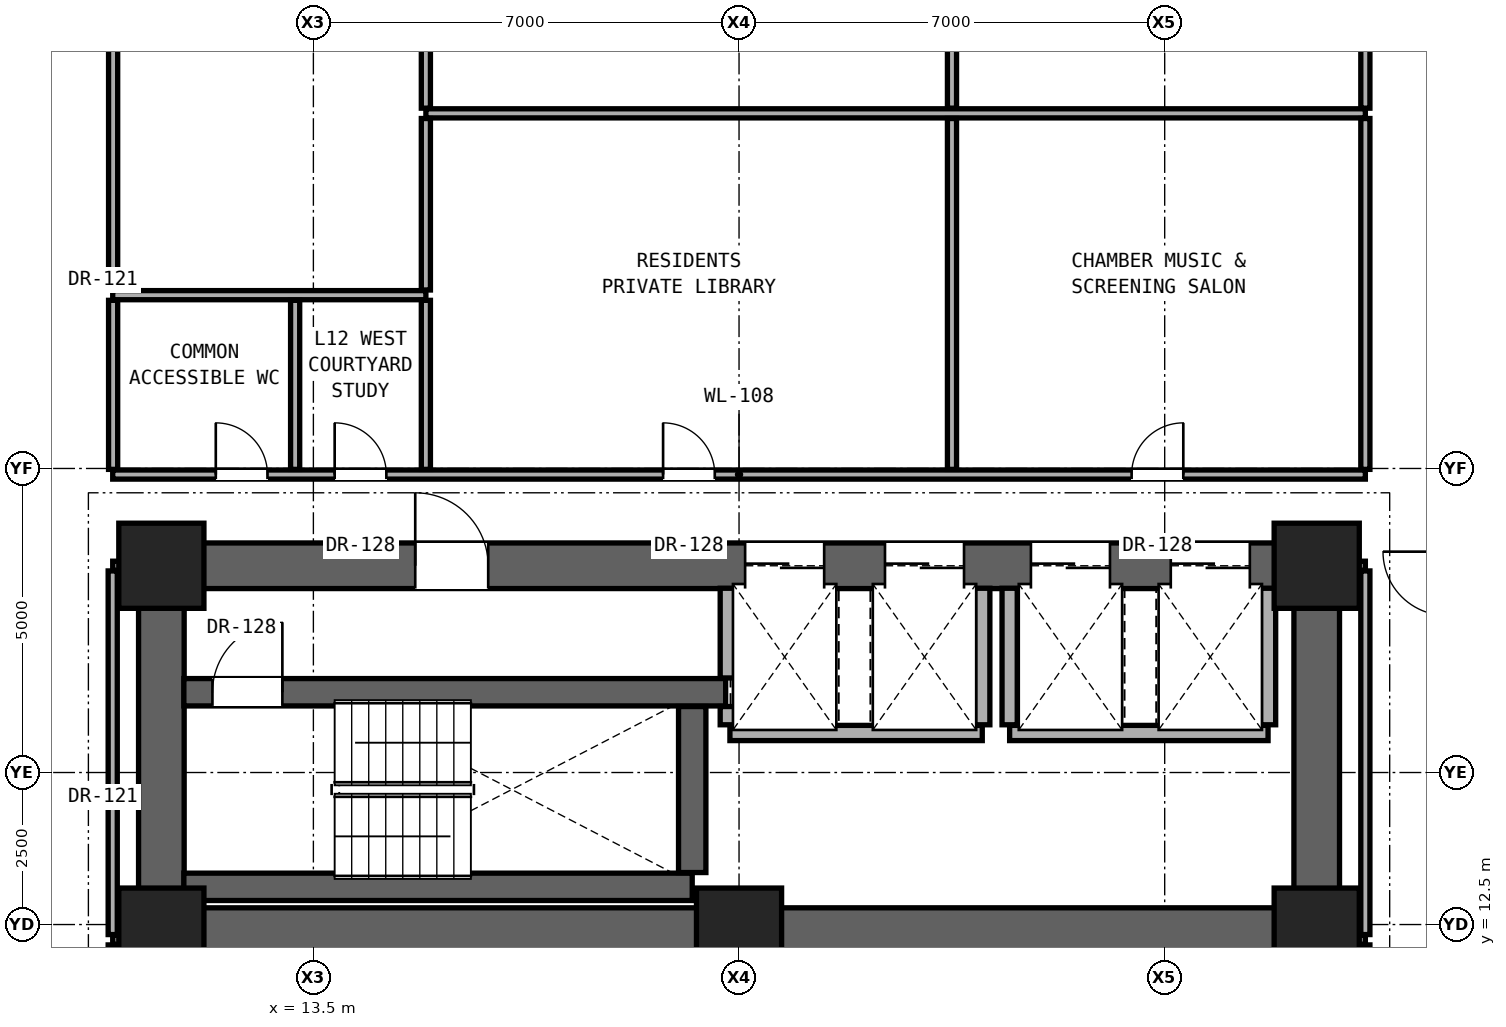
"""IFC4 building model, lengths in metres.
Left out: names, types, materials, properties, quantities, classifications, styles, units other than length and angle.
Written with IfcOpenShell. Run it as: python <this file> out.ifc"""

import sys

from ifc_helpers import new_model, si_unit, direction, frame, frame_2d, origin, origin_2d, place, context, subcontext, project, spatial, rectangle, extrude, element, fill, save


model = new_model("IFC4")
c1 = context("Model", 3, precision=1e-05, world=origin(), true_north=direction((0.0, 1.0)))
c2 = subcontext(c1, "Body", "Model", "MODEL_VIEW")
j1 = project(units=[si_unit("LENGTHUNIT", "METRE"), si_unit("PLANEANGLEUNIT", "RADIAN")], contexts=[c1])
p1 = place(None, origin())
s1 = spatial("IfcSite", under=j1, at=p1, CompositionType="ELEMENT")
p2 = place(p1, origin())
s2 = spatial("IfcBuilding", under=s1, at=p2, CompositionType="ELEMENT")
p3 = place(p2, frame((0.0, 0.0, 45.5)))
s3 = spatial("IfcBuildingStorey", under=s2, at=p3, CompositionType="ELEMENT", Elevation=45.5)
for number, where, z_axis, x_axis in (
    (1, (11.0, 12.4, 0.0), (0.0, 0.0, 1.0), (1.0, 0.0, 0.0)),
    (2, (20.5, 12.4, 0.0), (0.0, 0.0, 1.0), (1.0, 0.0, 0.0)),
    (3, (30.0, 12.4, 0.0), (0.0, 0.0, 1.0), (1.0, 0.0, 0.0)),
    (4, (11.0, 18.4, 0.0), (0.0, 0.0, 1.0), (1.0, 0.0, 0.0)),
    (5, (30.0, 18.4, 0.0), (0.0, 0.0, 1.0), (1.0, 0.0, 0.0)),
):
    element("IfcColumn", number, at=place(p3, frame(where, z_axis=z_axis, x_axis=x_axis)), inside=s3, PredefinedType="COLUMN", context=c2, shape_type="SweptSolid", body=[
        extrude(rectangle(XDim=1.4, YDim=1.4, at=origin_2d()), origin(), (0.0, 0.0, 1.0), 3.3),
    ])
p4 = place(p3, frame((11.0, 12.4, 0.0), z_axis=(0.0, 0.0, 1.0), x_axis=(1.0, 0.0, 0.0)))
e6 = element("IfcWall", 6, at=p4, inside=s3, PredefinedType="SHEAR", context=c2, shape_type="SweptSolid", body=[
    extrude(rectangle(XDim=19.0, YDim=0.75, at=frame_2d((9.5, 0.0))), origin(), (0.0, 0.0, 1.0), 3.06),
])
for number, where, z_axis, x_axis in (
    (7, (11.0, 12.4, 0.0), (0.0, 0.0, 1.0), (0.0, 1.0, 0.0)),
    (8, (30.0, 12.4, 0.0), (0.0, 0.0, 1.0), (0.0, 1.0, 0.0)),
):
    element("IfcWall", number, at=place(p3, frame(where, z_axis=z_axis, x_axis=x_axis)), inside=s3, PredefinedType="SHEAR", context=c2, shape_type="SweptSolid", body=[
        extrude(rectangle(XDim=6.0, YDim=0.75, at=frame_2d((3.0, 0.0))), origin(), (0.0, 0.0, 1.0), 3.06),
    ])
p5 = place(p3, frame((11.0, 18.4, 0.0), z_axis=(0.0, 0.0, 1.0), x_axis=(1.0, 0.0, 0.0)))
e9 = element("IfcWall", 9, at=p5, inside=s3, PredefinedType="SHEAR", context=c2, shape_type="SweptSolid", body=[
    extrude(rectangle(XDim=19.0, YDim=0.75, at=frame_2d((9.5, 0.0))), origin(), (0.0, 0.0, 1.0), 3.06),
])
p6 = place(p5, frame((4.175, 0.0, 0.0)))
e10 = element("IfcOpeningElement", 10, at=p6, cuts=e9, PredefinedType="OPENING", context=c2, shape_type="SweptSolid", body=[
    extrude(rectangle(XDim=1.2, YDim=2.25, at=frame_2d((0.6, 1.125))), frame((0.0, 0.385, 0.0), z_axis=(0.0, -1.0, 0.0), x_axis=(1.0, 0.0, 0.0)), (0.0, 0.0, 1.0), 0.77),
])
p7 = place(p5, frame((9.6, 0.0, 0.0)))
e11 = element("IfcOpeningElement", 11, at=p7, cuts=e9, PredefinedType="OPENING", context=c2, shape_type="SweptSolid", body=[
    extrude(rectangle(XDim=1.3, YDim=2.3, at=frame_2d((0.65, 1.15))), frame((0.0, 0.385, 0.0), z_axis=(0.0, -1.0, 0.0), x_axis=(1.0, 0.0, 0.0)), (0.0, 0.0, 1.0), 0.77),
])
p8 = place(p5, frame((11.9, 0.0, 0.0)))
e12 = element("IfcOpeningElement", 12, at=p8, cuts=e9, PredefinedType="OPENING", context=c2, shape_type="SweptSolid", body=[
    extrude(rectangle(XDim=1.3, YDim=2.3, at=frame_2d((0.65, 1.15))), frame((0.0, 0.385, 0.0), z_axis=(0.0, -1.0, 0.0), x_axis=(1.0, 0.0, 0.0)), (0.0, 0.0, 1.0), 0.77),
])
p9 = place(p5, frame((14.3, 0.0, 0.0)))
e13 = element("IfcOpeningElement", 13, at=p9, cuts=e9, PredefinedType="OPENING", context=c2, shape_type="SweptSolid", body=[
    extrude(rectangle(XDim=1.3, YDim=2.3, at=frame_2d((0.65, 1.15))), frame((0.0, 0.385, 0.0), z_axis=(0.0, -1.0, 0.0), x_axis=(1.0, 0.0, 0.0)), (0.0, 0.0, 1.0), 0.77),
])
p10 = place(p5, frame((16.6, 0.0, 0.0)))
e14 = element("IfcOpeningElement", 14, at=p10, cuts=e9, PredefinedType="OPENING", context=c2, shape_type="SweptSolid", body=[
    extrude(rectangle(XDim=1.3, YDim=2.3, at=frame_2d((0.65, 1.15))), frame((0.0, 0.385, 0.0), z_axis=(0.0, -1.0, 0.0), x_axis=(1.0, 0.0, 0.0)), (0.0, 0.0, 1.0), 0.77),
])
for number, where, z_axis, x_axis in (
    (15, (10.2, 12.25, 0.0), (0.0, 0.0, 1.0), (1.0, 0.0, 0.0)),
    (16, (30.37, 12.25, 0.0), (0.0, 0.0, 1.0), (1.0, 0.0, 0.0)),
):
    element("IfcWall", number, at=place(p3, frame(where, z_axis=z_axis, x_axis=x_axis)), inside=s3, PredefinedType="PARTITIONING", context=c2, shape_type="SweptSolid", body=[
        extrude(rectangle(XDim=0.43, YDim=0.15, at=frame_2d((0.215, 0.0))), origin(), (0.0, 0.0, 1.0), 3.06),
    ])
p11 = place(p3, frame((11.37, 13.12, 0.0), z_axis=(0.0, 0.0, 1.0), x_axis=(1.0, 0.0, 0.0)))
e17 = element("IfcWall", 17, at=p11, inside=s3, PredefinedType="SHEAR", context=c2, shape_type="SweptSolid", body=[
    extrude(rectangle(XDim=8.36, YDim=0.45, at=frame_2d((4.18, 0.0))), origin(), (0.0, 0.0, 1.0), 3.06),
])
p12 = place(p3, frame((20.35, 15.65, 0.0), z_axis=(0.0, 0.0, 1.0), x_axis=(1.0, 0.0, 0.0)))
e18 = element("IfcWall", 18, at=p12, inside=s3, PredefinedType="SOLIDWALL", context=c2, shape_type="SweptSolid", body=[
    extrude(rectangle(XDim=4.15, YDim=0.25, at=frame_2d((2.075, 0.0))), origin(), (0.0, 0.0, 1.0), 3.06),
])
p13 = place(p3, frame((24.95, 15.65, 0.0), z_axis=(0.0, 0.0, 1.0), x_axis=(1.0, 0.0, 0.0)))
e19 = element("IfcWall", 19, at=p13, inside=s3, PredefinedType="SOLIDWALL", context=c2, shape_type="SweptSolid", body=[
    extrude(rectangle(XDim=4.25, YDim=0.25, at=frame_2d((2.125, 0.0))), origin(), (0.0, 0.0, 1.0), 3.06),
])
p14 = place(p3, frame((11.37, 16.32, 0.0), z_axis=(0.0, 0.0, 1.0), x_axis=(1.0, 0.0, 0.0)))
e20 = element("IfcWall", 20, at=p14, inside=s3, PredefinedType="SHEAR", context=c2, shape_type="SweptSolid", body=[
    extrude(rectangle(XDim=8.91, YDim=0.45, at=frame_2d((4.455, 0.0))), origin(), (0.0, 0.0, 1.0), 3.06),
])
p15 = place(p14, frame((0.47, 0.0, 0.0)))
e21 = element("IfcOpeningElement", 21, at=p15, cuts=e20, PredefinedType="OPENING", context=c2, shape_type="SweptSolid", body=[
    extrude(rectangle(XDim=1.15, YDim=2.2, at=frame_2d((0.575, 1.1))), frame((0.0, 0.235, 0.0), z_axis=(0.0, -1.0, 0.0), x_axis=(1.0, 0.0, 0.0)), (0.0, 0.0, 1.0), 0.47),
])
for number, where, z_axis, x_axis in (
    (22, (10.2, 18.4, 0.0), (0.0, 0.0, 1.0), (1.0, 0.0, 0.0)),
    (23, (30.37, 18.4, 0.0), (0.0, 0.0, 1.0), (1.0, 0.0, 0.0)),
):
    element("IfcWall", number, at=place(p3, frame(where, z_axis=z_axis, x_axis=x_axis)), inside=s3, PredefinedType="PARTITIONING", context=c2, shape_type="SweptSolid", body=[
        extrude(rectangle(XDim=0.43, YDim=0.15, at=frame_2d((0.215, 0.0))), origin(), (0.0, 0.0, 1.0), 2.436),
    ])
p16 = place(p3, frame((10.2, 19.9, 0.0), z_axis=(0.0, 0.0, 1.0), x_axis=(1.0, 0.0, 0.0)))
e24 = element("IfcWall", 24, at=p16, inside=s3, PredefinedType="PARTITIONING", context=c2, shape_type="SweptSolid", body=[
    extrude(rectangle(XDim=20.6, YDim=0.15, at=frame_2d((10.3, 0.0))), origin(), (0.0, 0.0, 1.0), 2.104),
])
p17 = place(p16, frame((1.695, 0.0, 0.0)))
e25 = element("IfcOpeningElement", 25, at=p17, cuts=e24, PredefinedType="OPENING", context=c2, shape_type="SweptSolid", body=[
    extrude(rectangle(XDim=0.85, YDim=2.01, at=frame_2d((0.425, 1.005))), frame((0.0, 0.085, 0.0), z_axis=(0.0, -1.0, 0.0), x_axis=(1.0, 0.0, 0.0)), (0.0, 0.0, 1.0), 0.17),
])
p18 = place(p16, frame((3.65, 0.0, 0.0)))
e26 = element("IfcOpeningElement", 26, at=p18, cuts=e24, PredefinedType="OPENING", context=c2, shape_type="SweptSolid", body=[
    extrude(rectangle(XDim=0.85, YDim=2.01, at=frame_2d((0.425, 1.005))), frame((0.0, 0.085, 0.0), z_axis=(0.0, -1.0, 0.0), x_axis=(1.0, 0.0, 0.0)), (0.0, 0.0, 1.0), 0.17),
])
p19 = place(p16, frame((9.051, 0.0, 0.0)))
e27 = element("IfcOpeningElement", 27, at=p19, cuts=e24, PredefinedType="OPENING", context=c2, shape_type="SweptSolid", body=[
    extrude(rectangle(XDim=0.85, YDim=2.01, at=frame_2d((0.425, 1.005))), frame((0.0, 0.085, 0.0), z_axis=(0.0, -1.0, 0.0), x_axis=(1.0, 0.0, 0.0)), (0.0, 0.0, 1.0), 0.17),
])
p20 = place(p16, frame((16.756, 0.0, 0.0)))
e28 = element("IfcOpeningElement", 28, at=p20, cuts=e24, PredefinedType="OPENING", context=c2, shape_type="SweptSolid", body=[
    extrude(rectangle(XDim=0.85, YDim=2.01, at=frame_2d((0.425, 1.005))), frame((0.0, 0.085, 0.0), z_axis=(0.0, -1.0, 0.0), x_axis=(1.0, 0.0, 0.0)), (0.0, 0.0, 1.0), 0.17),
])
p21 = place(p3, frame((10.2, 22.85, 0.0), z_axis=(0.0, 0.0, 1.0), x_axis=(1.0, 0.0, 0.0)))
e29 = element("IfcWall", 29, at=p21, inside=s3, PredefinedType="PARTITIONING", context=c2, shape_type="SweptSolid", body=[
    extrude(rectangle(XDim=5.15, YDim=0.15, at=frame_2d((2.575, 0.0))), origin(), (0.0, 0.0, 1.0), 2.104),
])
p22 = place(p3, frame((15.35, 25.84, 0.0), z_axis=(0.0, 0.0, 1.0), x_axis=(1.0, 0.0, 0.0)))
e30 = element("IfcWall", 30, at=p22, inside=s3, PredefinedType="PARTITIONING", context=c2, shape_type="SweptSolid", body=[
    extrude(rectangle(XDim=15.45, YDim=0.15, at=frame_2d((7.725, 0.0))), origin(), (0.0, 0.0, 1.0), 2.104),
])
p23 = place(p3, frame((10.2, 8.334, 0.0), z_axis=(0.0, 0.0, 1.0), x_axis=(0.0, 1.0, 0.0)))
e31 = element("IfcWall", 31, at=p23, inside=s3, PredefinedType="PARTITIONING", context=c2, shape_type="SweptSolid", body=[
    extrude(rectangle(XDim=3.831, YDim=0.15, at=frame_2d((1.916, 0.0))), origin(), (0.0, 0.0, 1.0), 3.06),
])
p24 = place(p23, frame((1.39, 0.0, 0.0)))
e32 = element("IfcOpeningElement", 32, at=p24, cuts=e31, PredefinedType="OPENING", context=c2, shape_type="SweptSolid", body=[
    extrude(rectangle(XDim=1.05, YDim=2.2, at=frame_2d((0.525, 1.1))), frame((0.0, 0.085, 0.0), z_axis=(0.0, -1.0, 0.0), x_axis=(1.0, 0.0, 0.0)), (0.0, 0.0, 1.0), 0.17),
])
p25 = place(p3, frame((10.2, 12.335, 0.0), z_axis=(0.0, 0.0, 1.0), x_axis=(0.0, 1.0, 0.0)))
e33 = element("IfcWall", 33, at=p25, inside=s3, PredefinedType="PARTITIONING", context=c2, shape_type="SweptSolid", body=[
    extrude(rectangle(XDim=5.98, YDim=0.15, at=frame_2d((2.99, 0.0))), origin(), (0.0, 0.0, 1.0), 2.436),
])
p26 = place(p3, frame((10.207, 19.985, 0.0), z_axis=(0.0, 0.0, 1.0), x_axis=(0.0, 1.0, 0.0)))
e34 = element("IfcWall", 34, at=p26, inside=s3, PredefinedType="PARTITIONING", context=c2, shape_type="SweptSolid", body=[
    extrude(rectangle(XDim=2.78, YDim=0.15, at=frame_2d((1.39, 0.0))), origin(), (0.0, 0.0, 1.0), 3.06),
])
p27 = place(p3, frame((10.207, 22.935, 0.0), z_axis=(0.0, 0.0, 1.0), x_axis=(0.0, 1.0, 0.0)))
e35 = element("IfcWall", 35, at=p27, inside=s3, PredefinedType="PARTITIONING", context=c2, shape_type="SweptSolid", body=[
    extrude(rectangle(XDim=10.08, YDim=0.15, at=frame_2d((5.04, 0.0))), origin(), (0.0, 0.0, 1.0), 2.279),
])
p28 = place(p27, frame((4.565, 0.0, 0.0)))
e36 = element("IfcOpeningElement", 36, at=p28, cuts=e35, PredefinedType="OPENING", context=c2, shape_type="SweptSolid", body=[
    extrude(rectangle(XDim=0.95, YDim=2.15, at=frame_2d((0.475, 1.075))), frame((0.0, 0.085, 0.0), z_axis=(0.0, -1.0, 0.0), x_axis=(1.0, 0.0, 0.0)), (0.0, 0.0, 1.0), 0.17),
])
for number, where, z_axis, x_axis in (
    (37, (13.2, 19.985, 0.0), (0.0, 0.0, 1.0), (0.0, 1.0, 0.0)),
    (38, (15.35, 19.985, 0.0), (0.0, 0.0, 1.0), (0.0, 1.0, 0.0)),
):
    element("IfcWall", number, at=place(p3, frame(where, z_axis=z_axis, x_axis=x_axis)), inside=s3, PredefinedType="PARTITIONING", context=c2, shape_type="SweptSolid", body=[
        extrude(rectangle(XDim=2.78, YDim=0.15, at=frame_2d((1.39, 0.0))), origin(), (0.0, 0.0, 1.0), 3.06),
    ])
p29 = place(p3, frame((15.35, 22.935, 0.0), z_axis=(0.0, 0.0, 1.0), x_axis=(0.0, 1.0, 0.0)))
e39 = element("IfcWall", 39, at=p29, inside=s3, PredefinedType="PARTITIONING", context=c2, shape_type="SweptSolid", body=[
    extrude(rectangle(XDim=2.82, YDim=0.15, at=frame_2d((1.41, 0.0))), origin(), (0.0, 0.0, 1.0), 2.104),
])
p30 = place(p3, frame((15.35, 25.925, 0.0), z_axis=(0.0, 0.0, 1.0), x_axis=(0.0, 1.0, 0.0)))
e40 = element("IfcWall", 40, at=p30, inside=s3, PredefinedType="PARTITIONING", context=c2, shape_type="SweptSolid", body=[
    extrude(rectangle(XDim=7.09, YDim=0.15, at=frame_2d((3.545, 0.0))), origin(), (0.0, 0.0, 1.0), 2.104),
])
p31 = place(p3, frame((19.73, 13.355, 0.0), z_axis=(0.0, 0.0, 1.0), x_axis=(0.0, 1.0, 0.0)))
e41 = element("IfcWall", 41, at=p31, inside=s3, PredefinedType="SHEAR", context=c2, shape_type="SweptSolid", body=[
    extrude(rectangle(XDim=2.73, YDim=0.45, at=frame_2d((1.365, 0.0))), origin(), (0.0, 0.0, 1.0), 3.06),
])
p32 = place(p3, frame((20.315, 15.785, 0.0), z_axis=(0.0, 0.0, 1.0), x_axis=(0.0, 1.0, 0.0)))
e42 = element("IfcWall", 42, at=p32, inside=s3, PredefinedType="SOLIDWALL", context=c2, shape_type="SweptSolid", body=[
    extrude(rectangle(XDim=0.3, YDim=0.25, at=frame_2d((0.15, 0.0))), origin(), (0.0, 0.0, 1.0), 3.06),
])
p33 = place(p3, frame((20.315, 16.555, 0.0), z_axis=(0.0, 0.0, 1.0), x_axis=(0.0, 1.0, 0.0)))
e43 = element("IfcWall", 43, at=p33, inside=s3, PredefinedType="SOLIDWALL", context=c2, shape_type="SweptSolid", body=[
    extrude(rectangle(XDim=1.475, YDim=0.25, at=frame_2d((0.738, 0.0))), origin(), (0.0, 0.0, 1.0), 3.06),
])
p34 = place(p3, frame((24.002, 19.985, 0.0), z_axis=(0.0, 0.0, 1.0), x_axis=(0.0, 1.0, 0.0)))
e44 = element("IfcWall", 44, at=p34, inside=s3, PredefinedType="PARTITIONING", context=c2, shape_type="SweptSolid", body=[
    extrude(rectangle(XDim=5.77, YDim=0.15, at=frame_2d((2.885, 0.0))), origin(), (0.0, 0.0, 1.0), 2.104),
])
p35 = place(p3, frame((24.002, 25.925, 0.0), z_axis=(0.0, 0.0, 1.0), x_axis=(0.0, 1.0, 0.0)))
e45 = element("IfcWall", 45, at=p35, inside=s3, PredefinedType="PARTITIONING", context=c2, shape_type="SweptSolid", body=[
    extrude(rectangle(XDim=7.09, YDim=0.15, at=frame_2d((3.545, 0.0))), origin(), (0.0, 0.0, 1.0), 2.104),
])
for number, where, z_axis, x_axis in (
    (46, (24.5, 15.785, 0.0), (0.0, 0.0, 1.0), (0.0, 1.0, 0.0)),
    (47, (24.95, 15.785, 0.0), (0.0, 0.0, 1.0), (0.0, 1.0, 0.0)),
    (48, (29.2, 15.785, 0.0), (0.0, 0.0, 1.0), (0.0, 1.0, 0.0)),
):
    element("IfcWall", number, at=place(p3, frame(where, z_axis=z_axis, x_axis=x_axis)), inside=s3, PredefinedType="SOLIDWALL", context=c2, shape_type="SweptSolid", body=[
        extrude(rectangle(XDim=2.245, YDim=0.25, at=frame_2d((1.123, 0.0))), origin(), (0.0, 0.0, 1.0), 3.06),
    ])
p36 = place(p3, frame((30.8, 8.334, 0.0), z_axis=(0.0, 0.0, 1.0), x_axis=(0.0, 1.0, 0.0)))
e49 = element("IfcWall", 49, at=p36, inside=s3, PredefinedType="PARTITIONING", context=c2, shape_type="SweptSolid", body=[
    extrude(rectangle(XDim=3.831, YDim=0.15, at=frame_2d((1.916, 0.0))), origin(), (0.0, 0.0, 1.0), 3.06),
])
p37 = place(p36, frame((1.39, 0.0, 0.0)))
e50 = element("IfcOpeningElement", 50, at=p37, cuts=e49, PredefinedType="OPENING", context=c2, shape_type="SweptSolid", body=[
    extrude(rectangle(XDim=1.05, YDim=2.2, at=frame_2d((0.525, 1.1))), frame((0.0, 0.085, 0.0), z_axis=(0.0, -1.0, 0.0), x_axis=(1.0, 0.0, 0.0)), (0.0, 0.0, 1.0), 0.17),
])
p38 = place(p3, frame((30.8, 12.335, 0.0), z_axis=(0.0, 0.0, 1.0), x_axis=(0.0, 1.0, 0.0)))
e51 = element("IfcWall", 51, at=p38, inside=s3, PredefinedType="PARTITIONING", context=c2, shape_type="SweptSolid", body=[
    extrude(rectangle(XDim=5.98, YDim=0.15, at=frame_2d((2.99, 0.0))), origin(), (0.0, 0.0, 1.0), 2.436),
])
p39 = place(p3, frame((30.8, 19.985, 0.0), z_axis=(0.0, 0.0, 1.0), x_axis=(0.0, 1.0, 0.0)))
e52 = element("IfcWall", 52, at=p39, inside=s3, PredefinedType="PARTITIONING", context=c2, shape_type="SweptSolid", body=[
    extrude(rectangle(XDim=5.77, YDim=0.15, at=frame_2d((2.885, 0.0))), origin(), (0.0, 0.0, 1.0), 2.279),
])
p40 = place(p3, frame((30.8, 25.925, 0.0), z_axis=(0.0, 0.0, 1.0), x_axis=(0.0, 1.0, 0.0)))
e53 = element("IfcWall", 53, at=p40, inside=s3, PredefinedType="PARTITIONING", context=c2, shape_type="SweptSolid", body=[
    extrude(rectangle(XDim=7.09, YDim=0.15, at=frame_2d((3.545, 0.0))), origin(), (0.0, 0.0, 1.0), 2.279),
])
p41 = place(p6, origin())
e54 = element("IfcDoor", 54, at=p41, inside=s3, OperationType="SINGLE_SWING_LEFT", PredefinedType="DOOR", context=c2, shape_type="SweptSolid", body=[
    extrude(rectangle(XDim=1.2, YDim=2.25, at=frame_2d((0.6, 1.125))), frame((0.0, 0.025, 0.0), z_axis=(0.0, -1.0, 0.0), x_axis=(1.0, 0.0, 0.0)), (0.0, 0.0, 1.0), 0.05),
])
fill(e10, e54)
p42 = place(p15, origin())
e55 = element("IfcDoor", 55, at=p42, inside=s3, OperationType="SINGLE_SWING_RIGHT", PredefinedType="DOOR", context=c2, shape_type="SweptSolid", body=[
    extrude(rectangle(XDim=1.15, YDim=2.2, at=frame_2d((0.575, 1.1))), frame((0.0, 0.025, 0.0), z_axis=(0.0, -1.0, 0.0), x_axis=(1.0, 0.0, 0.0)), (0.0, 0.0, 1.0), 0.05),
])
fill(e21, e55)
p43 = place(p17, origin())
e56 = element("IfcDoor", 56, at=p43, inside=s3, OperationType="SINGLE_SWING_LEFT", PredefinedType="DOOR", context=c2, shape_type="SweptSolid", body=[
    extrude(rectangle(XDim=0.85, YDim=2.01, at=frame_2d((0.425, 1.005))), frame((0.0, 0.025, 0.0), z_axis=(0.0, -1.0, 0.0), x_axis=(1.0, 0.0, 0.0)), (0.0, 0.0, 1.0), 0.05),
])
fill(e25, e56)
p44 = place(p18, origin())
e57 = element("IfcDoor", 57, at=p44, inside=s3, OperationType="SINGLE_SWING_LEFT", PredefinedType="DOOR", context=c2, shape_type="SweptSolid", body=[
    extrude(rectangle(XDim=0.85, YDim=2.01, at=frame_2d((0.425, 1.005))), frame((0.0, 0.025, 0.0), z_axis=(0.0, -1.0, 0.0), x_axis=(1.0, 0.0, 0.0)), (0.0, 0.0, 1.0), 0.05),
])
fill(e26, e57)
p45 = place(p19, origin())
e58 = element("IfcDoor", 58, at=p45, inside=s3, OperationType="SINGLE_SWING_LEFT", PredefinedType="DOOR", context=c2, shape_type="SweptSolid", body=[
    extrude(rectangle(XDim=0.85, YDim=2.01, at=frame_2d((0.425, 1.005))), frame((0.0, 0.025, 0.0), z_axis=(0.0, -1.0, 0.0), x_axis=(1.0, 0.0, 0.0)), (0.0, 0.0, 1.0), 0.05),
])
fill(e27, e58)
p46 = place(p20, origin())
e59 = element("IfcDoor", 59, at=p46, inside=s3, OperationType="SINGLE_SWING_RIGHT", PredefinedType="DOOR", context=c2, shape_type="SweptSolid", body=[
    extrude(rectangle(XDim=0.85, YDim=2.01, at=frame_2d((0.425, 1.005))), frame((0.0, 0.025, 0.0), z_axis=(0.0, -1.0, 0.0), x_axis=(1.0, 0.0, 0.0)), (0.0, 0.0, 1.0), 0.05),
])
fill(e28, e59)
p47 = place(p7, origin())
e60 = element("IfcDoor", 60, at=p47, inside=s3, OperationType="DOUBLE_DOOR_SLIDING", PredefinedType="DOOR", context=c2, shape_type="SweptSolid", body=[
    extrude(rectangle(XDim=1.3, YDim=2.3, at=frame_2d((0.65, 1.15))), frame((0.0, 0.025, 0.0), z_axis=(0.0, -1.0, 0.0), x_axis=(1.0, 0.0, 0.0)), (0.0, 0.0, 1.0), 0.05),
])
fill(e11, e60)
p48 = place(p8, origin())
e61 = element("IfcDoor", 61, at=p48, inside=s3, OperationType="DOUBLE_DOOR_SLIDING", PredefinedType="DOOR", context=c2, shape_type="SweptSolid", body=[
    extrude(rectangle(XDim=1.3, YDim=2.3, at=frame_2d((0.65, 1.15))), frame((0.0, 0.025, 0.0), z_axis=(0.0, -1.0, 0.0), x_axis=(1.0, 0.0, 0.0)), (0.0, 0.0, 1.0), 0.05),
])
fill(e12, e61)
p49 = place(p9, origin())
e62 = element("IfcDoor", 62, at=p49, inside=s3, OperationType="DOUBLE_DOOR_SLIDING", PredefinedType="DOOR", context=c2, shape_type="SweptSolid", body=[
    extrude(rectangle(XDim=1.3, YDim=2.3, at=frame_2d((0.65, 1.15))), frame((0.0, 0.025, 0.0), z_axis=(0.0, -1.0, 0.0), x_axis=(1.0, 0.0, 0.0)), (0.0, 0.0, 1.0), 0.05),
])
fill(e13, e62)
p50 = place(p10, origin())
e63 = element("IfcDoor", 63, at=p50, inside=s3, OperationType="DOUBLE_DOOR_SLIDING", PredefinedType="DOOR", context=c2, shape_type="SweptSolid", body=[
    extrude(rectangle(XDim=1.3, YDim=2.3, at=frame_2d((0.65, 1.15))), frame((0.0, 0.025, 0.0), z_axis=(0.0, -1.0, 0.0), x_axis=(1.0, 0.0, 0.0)), (0.0, 0.0, 1.0), 0.05),
])
fill(e14, e63)
save(model, sys.argv[1])
